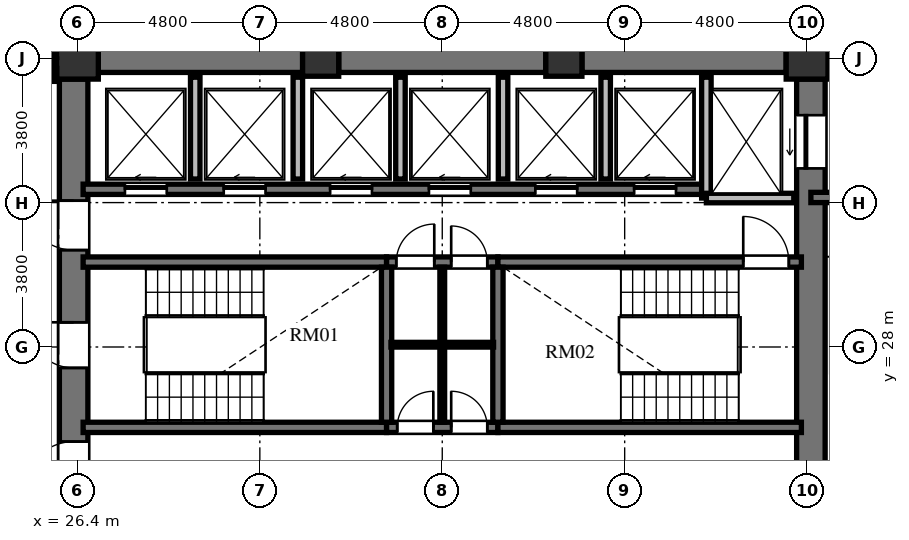
"""IFC4 building model, lengths in metres.
Left out: names, types, materials, properties, quantities, classifications, styles, units other than length and angle.
Written with IfcOpenShell. Run it as: python <this file> out.ifc"""

import sys

from ifc_helpers import new_model, si_unit, direction, frame, frame_2d, origin, origin_2d, place, context, subcontext, project, spatial, rectangle, extrude, element, fill, save


model = new_model("IFC4")
c1 = context("Model", 3, precision=1e-05, world=origin(), true_north=direction((0.0, 1.0)))
c2 = subcontext(c1, "Body", "Model", "MODEL_VIEW")
j1 = project(units=[si_unit("LENGTHUNIT", "METRE"), si_unit("PLANEANGLEUNIT", "RADIAN")], contexts=[c1])
p1 = place(None, origin())
s1 = spatial("IfcSite", under=j1, at=p1, CompositionType="ELEMENT")
p2 = place(p1, origin())
s2 = spatial("IfcBuilding", under=s1, at=p2, CompositionType="ELEMENT")
p3 = place(p2, frame((0.0, 0.0, 110.928)))
s3 = spatial("IfcBuildingStorey", under=s2, at=p3, CompositionType="ELEMENT", Elevation=110.928)
p4 = place(p3, frame((45.6, 35.6, 0.0), z_axis=(0.0, 0.0, 1.0), x_axis=(1.0, 0.0, 0.0)))
e1 = element("IfcColumn", 1, at=p4, inside=s3, PredefinedType="COLUMN", context=c2, shape_type="SweptSolid", body=[
    extrude(rectangle(XDim=1.1, YDim=1.1, at=origin_2d()), origin(), (0.0, 0.0, 1.0), 3.648),
])
for number, where, z_axis, x_axis in (
    (2, (39.2, 35.6, 0.0), (0.0, 0.0, 1.0), (1.0, 0.0, 0.0)),
    (3, (32.8, 35.6, 0.0), (0.0, 0.0, 1.0), (1.0, 0.0, 0.0)),
):
    element("IfcColumn", number, at=place(p3, frame(where, z_axis=z_axis, x_axis=x_axis)), inside=s3, PredefinedType="COLUMN", context=c2, shape_type="SweptSolid", body=[
        extrude(rectangle(XDim=0.95, YDim=0.95, at=origin_2d()), origin(), (0.0, 0.0, 1.0), 3.648),
    ])
p5 = place(p3, frame((26.4, 35.6, 0.0), z_axis=(0.0, 0.0, 1.0), x_axis=(1.0, 0.0, 0.0)))
e4 = element("IfcColumn", 4, at=p5, inside=s3, PredefinedType="COLUMN", context=c2, shape_type="SweptSolid", body=[
    extrude(rectangle(XDim=1.1, YDim=1.1, at=origin_2d()), origin(), (0.0, 0.0, 1.0), 3.648),
])
p6 = place(p3, frame((26.3, 20.95, 0.0), z_axis=(0.0, 0.0, 1.0), x_axis=(0.0, 1.0, 0.0)))
e5 = element("IfcWall", 5, at=p6, inside=s3, PredefinedType="SHEAR", context=c2, shape_type="SweptSolid", body=[
    extrude(rectangle(XDim=14.1, YDim=0.75, at=frame_2d((7.05, 0.0))), origin(), (0.0, 0.0, 1.0), 3.648),
])
p7 = place(p6, frame((6.5, 0.0, 0.0)))
e6 = element("IfcOpeningElement", 6, at=p7, cuts=e5, PredefinedType="OPENING", context=c2, shape_type="SweptSolid", body=[
    extrude(rectangle(XDim=1.2, YDim=2.15, at=frame_2d((0.6, 1.075))), frame((0.0, 0.385, 0.0), z_axis=(0.0, -1.0, 0.0), x_axis=(1.0, 0.0, 0.0)), (0.0, 0.0, 1.0), 0.77),
])
p8 = place(p6, frame((9.6, 0.0, 0.0)))
e7 = element("IfcOpeningElement", 7, at=p8, cuts=e5, PredefinedType="OPENING", context=c2, shape_type="SweptSolid", body=[
    extrude(rectangle(XDim=1.3, YDim=2.2, at=frame_2d((0.65, 1.1))), frame((0.0, 0.385, 0.0), z_axis=(0.0, -1.0, 0.0), x_axis=(1.0, 0.0, 0.0)), (0.0, 0.0, 1.0), 0.77),
])
p9 = place(p6, frame((3.26, 0.0, 0.0)))
e8 = element("IfcOpeningElement", 8, at=p9, cuts=e5, PredefinedType="OPENING", context=c2, shape_type="SweptSolid", body=[
    extrude(rectangle(XDim=1.3, YDim=2.2, at=frame_2d((0.65, 1.1))), frame((0.0, 0.385, 0.0), z_axis=(0.0, -1.0, 0.0), x_axis=(1.0, 0.0, 0.0)), (0.0, 0.0, 1.0), 0.77),
])
p10 = place(p3, frame((45.7, 20.95, 0.0), z_axis=(0.0, 0.0, 1.0), x_axis=(0.0, 1.0, 0.0)))
e9 = element("IfcWall", 9, at=p10, inside=s3, PredefinedType="SHEAR", context=c2, shape_type="SweptSolid", body=[
    extrude(rectangle(XDim=14.1, YDim=0.75, at=frame_2d((7.05, 0.0))), origin(), (0.0, 0.0, 1.0), 3.648),
])
p11 = place(p10, frame((11.75, 0.0, 0.0)))
e10 = element("IfcOpeningElement", 10, at=p11, cuts=e9, PredefinedType="OPENING", context=c2, shape_type="SweptSolid", body=[
    extrude(rectangle(XDim=1.4, YDim=2.3, at=frame_2d((0.7, 1.15))), frame((0.0, 0.385, 0.0), z_axis=(0.0, -1.0, 0.0), x_axis=(1.0, 0.0, 0.0)), (0.0, 0.0, 1.0), 0.77),
])
p12 = place(p10, frame((0.95, 0.0, 0.0)))
e11 = element("IfcOpeningElement", 11, at=p12, cuts=e9, PredefinedType="OPENING", context=c2, shape_type="SweptSolid", body=[
    extrude(rectangle(XDim=1.4, YDim=2.3, at=frame_2d((0.7, 1.15))), frame((0.0, 0.385, 0.0), z_axis=(0.0, -1.0, 0.0), x_axis=(1.0, 0.0, 0.0)), (0.0, 0.0, 1.0), 0.77),
])
p13 = place(p3, frame((26.95, 35.6, 0.0), z_axis=(0.0, 0.0, 1.0), x_axis=(1.0, 0.0, 0.0)))
e12 = element("IfcWall", 12, at=p13, inside=s3, PredefinedType="SHEAR", context=c2, shape_type="SweptSolid", body=[
    extrude(rectangle(XDim=5.375, YDim=0.75, at=frame_2d((2.688, 0.0))), origin(), (0.0, 0.0, 1.0), 3.648),
])
p14 = place(p3, frame((33.275, 35.6, 0.0), z_axis=(0.0, 0.0, 1.0), x_axis=(1.0, 0.0, 0.0)))
e13 = element("IfcWall", 13, at=p14, inside=s3, PredefinedType="SHEAR", context=c2, shape_type="SweptSolid", body=[
    extrude(rectangle(XDim=5.45, YDim=0.75, at=frame_2d((2.725, 0.0))), origin(), (0.0, 0.0, 1.0), 3.648),
])
p15 = place(p3, frame((39.675, 35.6, 0.0), z_axis=(0.0, 0.0, 1.0), x_axis=(1.0, 0.0, 0.0)))
e14 = element("IfcWall", 14, at=p15, inside=s3, PredefinedType="SHEAR", context=c2, shape_type="SweptSolid", body=[
    extrude(rectangle(XDim=5.375, YDim=0.75, at=frame_2d((2.688, 0.0))), origin(), (0.0, 0.0, 1.0), 3.648),
])
p16 = place(p3, frame((26.55, 30.235, 0.0), z_axis=(0.0, 0.0, 1.0), x_axis=(1.0, 0.0, 0.0)))
e15 = element("IfcWall", 15, at=p16, inside=s3, PredefinedType="SHEAR", context=c2, shape_type="SweptSolid", body=[
    extrude(rectangle(XDim=7.985, YDim=0.27, at=frame_2d((3.992, 0.0))), origin(), (0.0, 0.0, 1.0), 3.648),
])
p17 = place(p3, frame((34.535, 30.235, 0.0), z_axis=(0.0, 0.0, 1.0), x_axis=(1.0, 0.0, 0.0)))
e16 = element("IfcWall", 16, at=p17, inside=s3, PredefinedType="SHEAR", context=c2, shape_type="SweptSolid", body=[
    extrude(rectangle(XDim=2.93, YDim=0.27, at=frame_2d((1.465, 0.0))), origin(), (0.0, 0.0, 1.0), 3.648),
])
p18 = place(p17, frame((0.255, 0.0, 0.0)))
e17 = element("IfcOpeningElement", 17, at=p18, cuts=e16, PredefinedType="OPENING", context=c2, shape_type="SweptSolid", body=[
    extrude(rectangle(XDim=1.0, YDim=2.1, at=frame_2d((0.5, 1.05))), frame((0.0, 0.145, 0.0), z_axis=(0.0, -1.0, 0.0), x_axis=(1.0, 0.0, 0.0)), (0.0, 0.0, 1.0), 0.29),
])
p19 = place(p17, frame((1.7, 0.0, 0.0)))
e18 = element("IfcOpeningElement", 18, at=p19, cuts=e16, PredefinedType="OPENING", context=c2, shape_type="SweptSolid", body=[
    extrude(rectangle(XDim=0.95, YDim=2.1, at=frame_2d((0.475, 1.05))), frame((0.0, 0.145, 0.0), z_axis=(0.0, -1.0, 0.0), x_axis=(1.0, 0.0, 0.0)), (0.0, 0.0, 1.0), 0.29),
])
p20 = place(p3, frame((37.465, 30.235, 0.0), z_axis=(0.0, 0.0, 1.0), x_axis=(1.0, 0.0, 0.0)))
e19 = element("IfcWall", 19, at=p20, inside=s3, PredefinedType="SHEAR", context=c2, shape_type="SweptSolid", body=[
    extrude(rectangle(XDim=7.985, YDim=0.27, at=frame_2d((3.992, 0.0))), origin(), (0.0, 0.0, 1.0), 3.648),
])
p21 = place(p20, frame((6.455, 0.0, 0.0)))
e20 = element("IfcOpeningElement", 20, at=p21, cuts=e19, PredefinedType="OPENING", context=c2, shape_type="SweptSolid", body=[
    extrude(rectangle(XDim=1.2, YDim=2.15, at=frame_2d((0.6, 1.075))), frame((0.0, 0.145, 0.0), z_axis=(0.0, -1.0, 0.0), x_axis=(1.0, 0.0, 0.0)), (0.0, 0.0, 1.0), 0.29),
])
p22 = place(p3, frame((26.55, 25.885, 0.0), z_axis=(0.0, 0.0, 1.0), x_axis=(1.0, 0.0, 0.0)))
e21 = element("IfcWall", 21, at=p22, inside=s3, PredefinedType="SHEAR", context=c2, shape_type="SweptSolid", body=[
    extrude(rectangle(XDim=7.985, YDim=0.27, at=frame_2d((3.992, 0.0))), origin(), (0.0, 0.0, 1.0), 3.648),
])
p23 = place(p3, frame((34.535, 25.885, 0.0), z_axis=(0.0, 0.0, 1.0), x_axis=(1.0, 0.0, 0.0)))
e22 = element("IfcWall", 22, at=p23, inside=s3, PredefinedType="SHEAR", context=c2, shape_type="SweptSolid", body=[
    extrude(rectangle(XDim=2.93, YDim=0.27, at=frame_2d((1.465, 0.0))), origin(), (0.0, 0.0, 1.0), 3.648),
])
p24 = place(p23, frame((0.28, 0.0, 0.0)))
e23 = element("IfcOpeningElement", 23, at=p24, cuts=e22, PredefinedType="OPENING", context=c2, shape_type="SweptSolid", body=[
    extrude(rectangle(XDim=0.95, YDim=2.1, at=frame_2d((0.475, 1.05))), frame((0.0, 0.145, 0.0), z_axis=(0.0, -1.0, 0.0), x_axis=(1.0, 0.0, 0.0)), (0.0, 0.0, 1.0), 0.29),
])
p25 = place(p23, frame((1.7, 0.0, 0.0)))
e24 = element("IfcOpeningElement", 24, at=p25, cuts=e22, PredefinedType="OPENING", context=c2, shape_type="SweptSolid", body=[
    extrude(rectangle(XDim=0.95, YDim=2.1, at=frame_2d((0.475, 1.05))), frame((0.0, 0.145, 0.0), z_axis=(0.0, -1.0, 0.0), x_axis=(1.0, 0.0, 0.0)), (0.0, 0.0, 1.0), 0.29),
])
p26 = place(p3, frame((37.465, 25.885, 0.0), z_axis=(0.0, 0.0, 1.0), x_axis=(1.0, 0.0, 0.0)))
e25 = element("IfcWall", 25, at=p26, inside=s3, PredefinedType="SHEAR", context=c2, shape_type="SweptSolid", body=[
    extrude(rectangle(XDim=7.985, YDim=0.27, at=frame_2d((3.992, 0.0))), origin(), (0.0, 0.0, 1.0), 3.648),
])
for number, where, z_axis, x_axis in (
    (26, (34.535, 26.02, 0.0), (0.0, 0.0, 1.0), (0.0, 1.0, 0.0)),
    (27, (37.465, 26.02, 0.0), (0.0, 0.0, 1.0), (0.0, 1.0, 0.0)),
):
    element("IfcWall", number, at=place(p3, frame(where, z_axis=z_axis, x_axis=x_axis)), inside=s3, PredefinedType="SHEAR", context=c2, shape_type="SweptSolid", body=[
        extrude(rectangle(XDim=4.08, YDim=0.27, at=frame_2d((2.04, 0.0))), origin(), (0.0, 0.0, 1.0), 3.648),
    ])
p27 = place(p3, frame((34.65, 28.06, 0.0), z_axis=(0.0, 0.0, 1.0), x_axis=(1.0, 0.0, 0.0)))
e28 = element("IfcWall", 28, at=p27, inside=s3, PredefinedType="PARTITIONING", context=c2, shape_type="SweptSolid", body=[
    extrude(rectangle(XDim=2.7, YDim=0.125, at=frame_2d((1.35, 0.0))), origin(), (0.0, 0.0, 1.0), 3.428),
])
p28 = place(p3, frame((36.0, 26.02, 0.0), z_axis=(0.0, 0.0, 1.0), x_axis=(0.0, 1.0, 0.0)))
e29 = element("IfcWall", 29, at=p28, inside=s3, PredefinedType="PARTITIONING", context=c2, shape_type="SweptSolid", body=[
    extrude(rectangle(XDim=4.08, YDim=0.125, at=frame_2d((2.04, 0.0))), origin(), (0.0, 0.0, 1.0), 3.428),
])
p29 = place(p3, frame((26.55, 32.15, 0.0), z_axis=(0.0, 0.0, 1.0), x_axis=(1.0, 0.0, 0.0)))
e30 = element("IfcWall", 30, at=p29, inside=s3, PredefinedType="SHEAR", context=c2, shape_type="SweptSolid", body=[
    extrude(rectangle(XDim=16.4, YDim=0.27, at=frame_2d((8.2, 0.0))), origin(), (0.0, 0.0, 1.0), 3.648),
])
p30 = place(p29, frame((1.1, 0.0, 0.0)))
e31 = element("IfcOpeningElement", 31, at=p30, cuts=e30, PredefinedType="OPENING", context=c2, shape_type="SweptSolid", body=[
    extrude(rectangle(XDim=1.1, YDim=2.2, at=frame_2d((0.55, 1.1))), frame((0.0, 0.145, 0.0), z_axis=(0.0, -1.0, 0.0), x_axis=(1.0, 0.0, 0.0)), (0.0, 0.0, 1.0), 0.29),
])
p31 = place(p29, frame((3.7, 0.0, 0.0)))
e32 = element("IfcOpeningElement", 32, at=p31, cuts=e30, PredefinedType="OPENING", context=c2, shape_type="SweptSolid", body=[
    extrude(rectangle(XDim=1.1, YDim=2.2, at=frame_2d((0.55, 1.1))), frame((0.0, 0.145, 0.0), z_axis=(0.0, -1.0, 0.0), x_axis=(1.0, 0.0, 0.0)), (0.0, 0.0, 1.0), 0.29),
])
p32 = place(p29, frame((6.5, 0.0, 0.0)))
e33 = element("IfcOpeningElement", 33, at=p32, cuts=e30, PredefinedType="OPENING", context=c2, shape_type="SweptSolid", body=[
    extrude(rectangle(XDim=1.1, YDim=2.2, at=frame_2d((0.55, 1.1))), frame((0.0, 0.145, 0.0), z_axis=(0.0, -1.0, 0.0), x_axis=(1.0, 0.0, 0.0)), (0.0, 0.0, 1.0), 0.29),
])
p33 = place(p29, frame((9.1, 0.0, 0.0)))
e34 = element("IfcOpeningElement", 34, at=p33, cuts=e30, PredefinedType="OPENING", context=c2, shape_type="SweptSolid", body=[
    extrude(rectangle(XDim=1.1, YDim=2.2, at=frame_2d((0.55, 1.1))), frame((0.0, 0.145, 0.0), z_axis=(0.0, -1.0, 0.0), x_axis=(1.0, 0.0, 0.0)), (0.0, 0.0, 1.0), 0.29),
])
p34 = place(p29, frame((11.9, 0.0, 0.0)))
e35 = element("IfcOpeningElement", 35, at=p34, cuts=e30, PredefinedType="OPENING", context=c2, shape_type="SweptSolid", body=[
    extrude(rectangle(XDim=1.1, YDim=2.2, at=frame_2d((0.55, 1.1))), frame((0.0, 0.145, 0.0), z_axis=(0.0, -1.0, 0.0), x_axis=(1.0, 0.0, 0.0)), (0.0, 0.0, 1.0), 0.29),
])
p35 = place(p29, frame((14.5, 0.0, 0.0)))
e36 = element("IfcOpeningElement", 36, at=p35, cuts=e30, PredefinedType="OPENING", context=c2, shape_type="SweptSolid", body=[
    extrude(rectangle(XDim=1.1, YDim=2.2, at=frame_2d((0.55, 1.1))), frame((0.0, 0.145, 0.0), z_axis=(0.0, -1.0, 0.0), x_axis=(1.0, 0.0, 0.0)), (0.0, 0.0, 1.0), 0.29),
])
p36 = place(p3, frame((42.95, 31.92, 0.0), z_axis=(0.0, 0.0, 1.0), x_axis=(0.0, 1.0, 0.0)))
e37 = element("IfcWall", 37, at=p36, inside=s3, PredefinedType="SOLIDWALL", context=c2, shape_type="SweptSolid", body=[
    extrude(rectangle(XDim=3.18, YDim=0.25, at=frame_2d((1.59, 0.0))), origin(), (0.0, 0.0, 1.0), 3.428),
])
p37 = place(p3, frame((42.95, 31.92, 0.0), z_axis=(0.0, 0.0, 1.0), x_axis=(1.0, 0.0, 0.0)))
e38 = element("IfcWall", 38, at=p37, inside=s3, PredefinedType="SOLIDWALL", context=c2, shape_type="SweptSolid", body=[
    extrude(rectangle(XDim=2.3, YDim=0.25, at=frame_2d((1.15, 0.0))), origin(), (0.0, 0.0, 1.0), 3.428),
])
for number, where, z_axis, x_axis in (
    (39, (29.5, 32.42, 0.0), (0.0, 0.0, 1.0), (0.0, 1.0, 0.0)),
    (40, (32.2, 32.42, 0.0), (0.0, 0.0, 1.0), (0.0, 1.0, 0.0)),
    (41, (34.9, 32.42, 0.0), (0.0, 0.0, 1.0), (0.0, 1.0, 0.0)),
    (42, (37.6, 32.42, 0.0), (0.0, 0.0, 1.0), (0.0, 1.0, 0.0)),
    (43, (40.3, 32.42, 0.0), (0.0, 0.0, 1.0), (0.0, 1.0, 0.0)),
):
    element("IfcWall", number, at=place(p3, frame(where, z_axis=z_axis, x_axis=x_axis)), inside=s3, PredefinedType="SOLIDWALL", context=c2, shape_type="SweptSolid", body=[
        extrude(rectangle(XDim=2.68, YDim=0.25, at=frame_2d((1.34, 0.0))), origin(), (0.0, 0.0, 1.0), 3.428),
    ])
p38 = place(p3, frame((45.7, 31.935, 0.0), z_axis=(0.0, 0.0, 1.0), x_axis=(1.0, 0.0, 0.0)))
e44 = element("IfcWall", 44, at=p38, inside=s3, PredefinedType="SHEAR", context=c2, shape_type="SweptSolid", body=[
    extrude(rectangle(XDim=4.715, YDim=0.27, at=frame_2d((2.357, 0.0))), origin(), (0.0, 0.0, 1.0), 3.648),
])
p39 = place(p3, frame((25.83, 36.21, 0.0), z_axis=(0.0, 0.0, 1.0), x_axis=(0.0, -1.0, 0.0)))
e45 = element("IfcWall", 45, at=p39, inside=s3, PredefinedType="PARTITIONING", context=c2, shape_type="SweptSolid", body=[
    extrude(rectangle(XDim=1.22, YDim=0.18, at=frame_2d((0.61, 0.0))), origin(), (0.0, 0.0, 1.0), 3.428),
])
p40 = place(p7, origin())
e46 = element("IfcDoor", 46, at=p40, inside=s3, OperationType="SINGLE_SWING_RIGHT", PredefinedType="DOOR", context=c2, shape_type="SweptSolid", body=[
    extrude(rectangle(XDim=1.2, YDim=2.15, at=frame_2d((0.6, 1.075))), frame((0.0, 0.025, 0.0), z_axis=(0.0, -1.0, 0.0), x_axis=(1.0, 0.0, 0.0)), (0.0, 0.0, 1.0), 0.05),
])
fill(e6, e46)
p41 = place(p21, origin())
e47 = element("IfcDoor", 47, at=p41, inside=s3, OperationType="SINGLE_SWING_LEFT", PredefinedType="DOOR", context=c2, shape_type="SweptSolid", body=[
    extrude(rectangle(XDim=1.2, YDim=2.15, at=frame_2d((0.6, 1.075))), frame((0.0, 0.025, 0.0), z_axis=(0.0, -1.0, 0.0), x_axis=(1.0, 0.0, 0.0)), (0.0, 0.0, 1.0), 0.05),
])
fill(e20, e47)
p42 = place(p24, origin())
e48 = element("IfcDoor", 48, at=p42, inside=s3, OperationType="SINGLE_SWING_RIGHT", PredefinedType="DOOR", context=c2, shape_type="SweptSolid", body=[
    extrude(rectangle(XDim=0.95, YDim=2.1, at=frame_2d((0.475, 1.05))), frame((0.0, 0.025, 0.0), z_axis=(0.0, -1.0, 0.0), x_axis=(1.0, 0.0, 0.0)), (0.0, 0.0, 1.0), 0.05),
])
fill(e23, e48)
p43 = place(p25, origin())
e49 = element("IfcDoor", 49, at=p43, inside=s3, OperationType="SINGLE_SWING_LEFT", PredefinedType="DOOR", context=c2, shape_type="SweptSolid", body=[
    extrude(rectangle(XDim=0.95, YDim=2.1, at=frame_2d((0.475, 1.05))), frame((0.0, 0.025, 0.0), z_axis=(0.0, -1.0, 0.0), x_axis=(1.0, 0.0, 0.0)), (0.0, 0.0, 1.0), 0.05),
])
fill(e24, e49)
p44 = place(p18, origin())
e50 = element("IfcDoor", 50, at=p44, inside=s3, OperationType="SINGLE_SWING_RIGHT", PredefinedType="DOOR", context=c2, shape_type="SweptSolid", body=[
    extrude(rectangle(XDim=1.0, YDim=2.1, at=frame_2d((0.5, 1.05))), frame((0.0, 0.025, 0.0), z_axis=(0.0, -1.0, 0.0), x_axis=(1.0, 0.0, 0.0)), (0.0, 0.0, 1.0), 0.05),
])
fill(e17, e50)
p45 = place(p19, origin())
e51 = element("IfcDoor", 51, at=p45, inside=s3, OperationType="SINGLE_SWING_LEFT", PredefinedType="DOOR", context=c2, shape_type="SweptSolid", body=[
    extrude(rectangle(XDim=0.95, YDim=2.1, at=frame_2d((0.475, 1.05))), frame((0.0, 0.025, 0.0), z_axis=(0.0, -1.0, 0.0), x_axis=(1.0, 0.0, 0.0)), (0.0, 0.0, 1.0), 0.05),
])
fill(e18, e51)
p46 = place(p8, origin())
e52 = element("IfcDoor", 52, at=p46, inside=s3, OperationType="SINGLE_SWING_RIGHT", PredefinedType="DOOR", context=c2, shape_type="SweptSolid", body=[
    extrude(rectangle(XDim=1.3, YDim=2.2, at=frame_2d((0.65, 1.1))), frame((0.0, 0.025, 0.0), z_axis=(0.0, -1.0, 0.0), x_axis=(1.0, 0.0, 0.0)), (0.0, 0.0, 1.0), 0.05),
])
fill(e7, e52)
p47 = place(p9, origin())
e53 = element("IfcDoor", 53, at=p47, inside=s3, OperationType="SINGLE_SWING_LEFT", PredefinedType="DOOR", context=c2, shape_type="SweptSolid", body=[
    extrude(rectangle(XDim=1.3, YDim=2.2, at=frame_2d((0.65, 1.1))), frame((0.0, 0.025, 0.0), z_axis=(0.0, -1.0, 0.0), x_axis=(1.0, 0.0, 0.0)), (0.0, 0.0, 1.0), 0.05),
])
fill(e8, e53)
p48 = place(p30, origin())
e54 = element("IfcDoor", 54, at=p48, inside=s3, OperationType="SLIDING_TO_LEFT", PredefinedType="DOOR", context=c2, shape_type="SweptSolid", body=[
    extrude(rectangle(XDim=1.1, YDim=2.2, at=frame_2d((0.55, 1.1))), frame((0.0, 0.025, 0.0), z_axis=(0.0, -1.0, 0.0), x_axis=(1.0, 0.0, 0.0)), (0.0, 0.0, 1.0), 0.05),
])
fill(e31, e54)
p49 = place(p31, origin())
e55 = element("IfcDoor", 55, at=p49, inside=s3, OperationType="SLIDING_TO_LEFT", PredefinedType="DOOR", context=c2, shape_type="SweptSolid", body=[
    extrude(rectangle(XDim=1.1, YDim=2.2, at=frame_2d((0.55, 1.1))), frame((0.0, 0.025, 0.0), z_axis=(0.0, -1.0, 0.0), x_axis=(1.0, 0.0, 0.0)), (0.0, 0.0, 1.0), 0.05),
])
fill(e32, e55)
p50 = place(p32, origin())
e56 = element("IfcDoor", 56, at=p50, inside=s3, OperationType="SLIDING_TO_LEFT", PredefinedType="DOOR", context=c2, shape_type="SweptSolid", body=[
    extrude(rectangle(XDim=1.1, YDim=2.2, at=frame_2d((0.55, 1.1))), frame((0.0, 0.025, 0.0), z_axis=(0.0, -1.0, 0.0), x_axis=(1.0, 0.0, 0.0)), (0.0, 0.0, 1.0), 0.05),
])
fill(e33, e56)
p51 = place(p33, origin())
e57 = element("IfcDoor", 57, at=p51, inside=s3, OperationType="SLIDING_TO_LEFT", PredefinedType="DOOR", context=c2, shape_type="SweptSolid", body=[
    extrude(rectangle(XDim=1.1, YDim=2.2, at=frame_2d((0.55, 1.1))), frame((0.0, 0.025, 0.0), z_axis=(0.0, -1.0, 0.0), x_axis=(1.0, 0.0, 0.0)), (0.0, 0.0, 1.0), 0.05),
])
fill(e34, e57)
p52 = place(p34, origin())
e58 = element("IfcDoor", 58, at=p52, inside=s3, OperationType="SLIDING_TO_LEFT", PredefinedType="DOOR", context=c2, shape_type="SweptSolid", body=[
    extrude(rectangle(XDim=1.1, YDim=2.2, at=frame_2d((0.55, 1.1))), frame((0.0, 0.025, 0.0), z_axis=(0.0, -1.0, 0.0), x_axis=(1.0, 0.0, 0.0)), (0.0, 0.0, 1.0), 0.05),
])
fill(e35, e58)
p53 = place(p35, origin())
e59 = element("IfcDoor", 59, at=p53, inside=s3, OperationType="SLIDING_TO_LEFT", PredefinedType="DOOR", context=c2, shape_type="SweptSolid", body=[
    extrude(rectangle(XDim=1.1, YDim=2.2, at=frame_2d((0.55, 1.1))), frame((0.0, 0.025, 0.0), z_axis=(0.0, -1.0, 0.0), x_axis=(1.0, 0.0, 0.0)), (0.0, 0.0, 1.0), 0.05),
])
fill(e36, e59)
p54 = place(p11, origin())
e60 = element("IfcDoor", 60, at=p54, inside=s3, OperationType="SLIDING_TO_LEFT", PredefinedType="DOOR", context=c2, shape_type="SweptSolid", body=[
    extrude(rectangle(XDim=1.4, YDim=2.3, at=frame_2d((0.7, 1.15))), frame((0.0, 0.025, 0.0), z_axis=(0.0, -1.0, 0.0), x_axis=(1.0, 0.0, 0.0)), (0.0, 0.0, 1.0), 0.05),
])
fill(e10, e60)
save(model, sys.argv[1])
